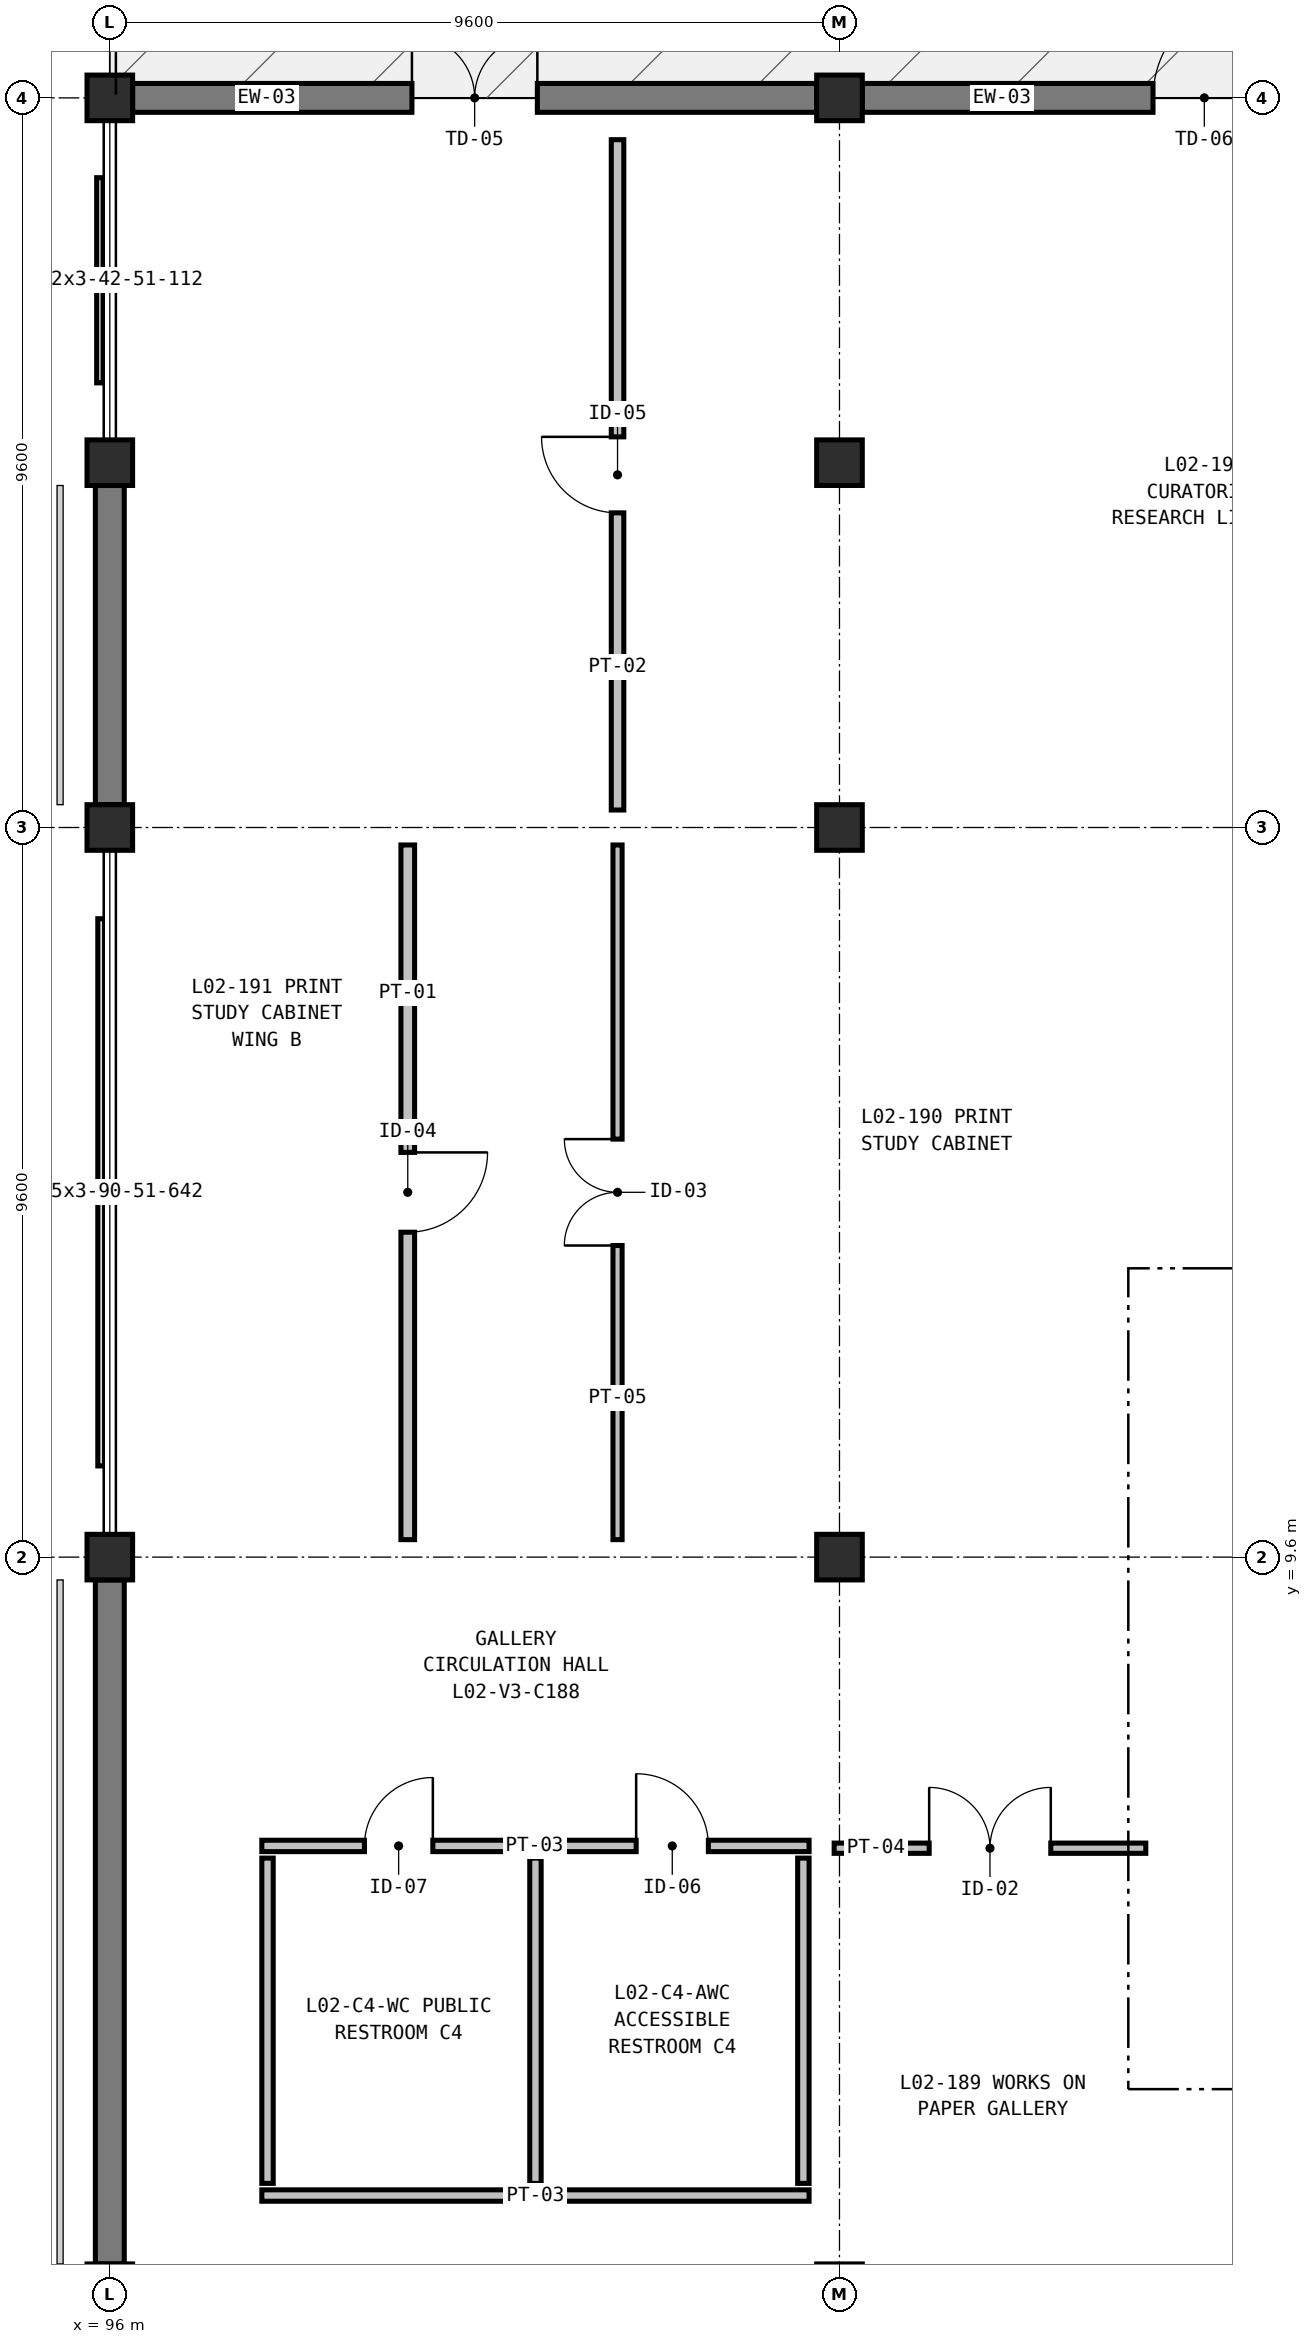
"""IFC4 building model, lengths in metres.
Left out: names, types, materials, properties, quantities, classifications, styles, units other than length and angle.
Written with IfcOpenShell. Run it as: python <this file> out.ifc"""

import sys

from ifc_helpers import new_model, si_unit, direction, frame, frame_2d, origin, origin_2d, place, context, subcontext, project, spatial, rectangle, extrude, element, fill, save


model = new_model("IFC4")
c1 = context("Model", 3, precision=1e-05, world=origin(), true_north=direction((0.0, 1.0)))
c2 = subcontext(c1, "Body", "Model", "MODEL_VIEW")
j1 = project(units=[si_unit("LENGTHUNIT", "METRE"), si_unit("PLANEANGLEUNIT", "RADIAN")], contexts=[c1])
p1 = place(None, origin())
s1 = spatial("IfcSite", under=j1, at=p1, CompositionType="ELEMENT")
p2 = place(p1, origin())
s2 = spatial("IfcBuilding", under=s1, at=p2, CompositionType="ELEMENT")
p3 = place(p2, frame((0.0, 0.0, 11.4)))
s3 = spatial("IfcBuildingStorey", under=s2, at=p3, CompositionType="ELEMENT", Elevation=11.4)
for number, where, z_axis, x_axis in (
    (1, (96.0, 9.6, 0.0), (0.0, 0.0, 1.0), (1.0, 0.0, 0.0)),
    (2, (96.0, 19.2, 0.0), (0.0, 0.0, 1.0), (1.0, 0.0, 0.0)),
    (3, (96.0, 24.0, 0.0), (0.0, 0.0, 1.0), (1.0, 0.0, 0.0)),
    (4, (96.0, 28.8, 0.0), (0.0, 0.0, 1.0), (1.0, 0.0, 0.0)),
    (5, (105.6, 9.6, 0.0), (0.0, 0.0, 1.0), (1.0, 0.0, 0.0)),
    (6, (105.6, 19.2, 0.0), (0.0, 0.0, 1.0), (1.0, 0.0, 0.0)),
    (7, (105.6, 24.0, 0.0), (0.0, 0.0, 1.0), (1.0, 0.0, 0.0)),
    (8, (105.6, 28.8, 0.0), (0.0, 0.0, 1.0), (1.0, 0.0, 0.0)),
):
    element("IfcColumn", number, at=place(p3, frame(where, z_axis=z_axis, x_axis=x_axis)), inside=s3, PredefinedType="COLUMN", context=c2, shape_type="SweptSolid", body=[
        extrude(rectangle(XDim=0.6, YDim=0.6, at=origin_2d()), origin(), (0.0, 0.0, 1.0), 5.4),
    ])
p4 = place(p3, frame((96.3, 28.8, 0.0), z_axis=(0.0, 0.0, 1.0), x_axis=(1.0, 0.0, 0.0)))
e9 = element("IfcWall", 9, at=p4, inside=s3, PredefinedType="SOLIDWALL", context=c2, shape_type="SweptSolid", body=[
    extrude(rectangle(XDim=9.0, YDim=0.38, at=frame_2d((4.5, 0.0))), origin(), (0.0, 0.0, 1.0), 5.1),
])
p5 = place(p4, frame((3.675, 0.0, 0.0)))
e10 = element("IfcOpeningElement", 10, at=p5, cuts=e9, PredefinedType="OPENING", context=c2, shape_type="SweptSolid", body=[
    extrude(rectangle(XDim=1.65, YDim=2.35, at=frame_2d((0.825, 1.175))), frame((0.0, 0.2, 0.0), z_axis=(0.0, -1.0, 0.0), x_axis=(1.0, 0.0, 0.0)), (0.0, 0.0, 1.0), 0.4),
])
p6 = place(p3, frame((105.9, 28.8, 0.0), z_axis=(0.0, 0.0, 1.0), x_axis=(1.0, 0.0, 0.0)))
e11 = element("IfcWall", 11, at=p6, inside=s3, PredefinedType="SOLIDWALL", context=c2, shape_type="SweptSolid", body=[
    extrude(rectangle(XDim=9.0, YDim=0.38, at=frame_2d((4.5, 0.0))), origin(), (0.0, 0.0, 1.0), 5.1),
])
p7 = place(p6, frame((3.825, 0.0, 0.0)))
e12 = element("IfcOpeningElement", 12, at=p7, cuts=e11, PredefinedType="OPENING", context=c2, shape_type="SweptSolid", body=[
    extrude(rectangle(XDim=1.35, YDim=2.2, at=frame_2d((0.675, 1.1))), frame((0.0, 0.2, 0.0), z_axis=(0.0, -1.0, 0.0), x_axis=(1.0, 0.0, 0.0)), (0.0, 0.0, 1.0), 0.4),
])
p8 = place(p3, frame((96.0, 0.3, 0.0), z_axis=(0.0, 0.0, 1.0), x_axis=(0.0, 1.0, 0.0)))
e13 = element("IfcWall", 13, at=p8, inside=s3, PredefinedType="SOLIDWALL", context=c2, shape_type="SweptSolid", body=[
    extrude(rectangle(XDim=9.0, YDim=0.38, at=frame_2d((4.5, 0.0))), origin(), (0.0, 0.0, 1.0), 5.1),
])
p9 = place(p3, frame((96.0, 19.5, 0.0), z_axis=(0.0, 0.0, 1.0), x_axis=(0.0, 1.0, 0.0)))
e14 = element("IfcWall", 14, at=p9, inside=s3, PredefinedType="SOLIDWALL", context=c2, shape_type="SweptSolid", body=[
    extrude(rectangle(XDim=4.2, YDim=0.38, at=frame_2d((2.1, 0.0))), origin(), (0.0, 0.0, 1.0), 5.1),
])
p10 = place(p3, frame((98.0, 5.8, 0.0), z_axis=(0.0, 0.0, 1.0), x_axis=(1.0, 0.0, 0.0)))
e15 = element("IfcWall", 15, at=p10, inside=s3, PredefinedType="PARTITIONING", context=c2, shape_type="SweptSolid", body=[
    extrude(rectangle(XDim=7.2, YDim=0.15, at=frame_2d((3.6, 0.0))), origin(), (0.0, 0.0, 1.0), 5.1),
])
p11 = place(p10, frame((1.35, 0.0, 0.0)))
e16 = element("IfcOpeningElement", 16, at=p11, cuts=e15, PredefinedType="OPENING", context=c2, shape_type="SweptSolid", body=[
    extrude(rectangle(XDim=0.9, YDim=2.1, at=frame_2d((0.45, 1.05))), frame((0.0, 0.085, 0.0), z_axis=(0.0, -1.0, 0.0), x_axis=(1.0, 0.0, 0.0)), (0.0, 0.0, 1.0), 0.17),
])
p12 = place(p10, frame((4.925, 0.0, 0.0)))
e17 = element("IfcOpeningElement", 17, at=p12, cuts=e15, PredefinedType="OPENING", context=c2, shape_type="SweptSolid", body=[
    extrude(rectangle(XDim=0.95, YDim=2.15, at=frame_2d((0.475, 1.075))), frame((0.0, 0.085, 0.0), z_axis=(0.0, -1.0, 0.0), x_axis=(1.0, 0.0, 0.0)), (0.0, 0.0, 1.0), 0.17),
])
p13 = place(p3, frame((98.0, 1.2, 0.0), z_axis=(0.0, 0.0, 1.0), x_axis=(1.0, 0.0, 0.0)))
e18 = element("IfcWall", 18, at=p13, inside=s3, PredefinedType="PARTITIONING", context=c2, shape_type="SweptSolid", body=[
    extrude(rectangle(XDim=7.2, YDim=0.15, at=frame_2d((3.6, 0.0))), origin(), (0.0, 0.0, 1.0), 5.1),
])
for number, where, z_axis, x_axis in (
    (19, (98.075, 1.36, 0.0), (0.0, 0.0, 1.0), (0.0, 1.0, 0.0)),
    (20, (101.6, 1.36, 0.0), (0.0, 0.0, 1.0), (0.0, 1.0, 0.0)),
    (21, (105.125, 1.36, 0.0), (0.0, 0.0, 1.0), (0.0, 1.0, 0.0)),
):
    element("IfcWall", number, at=place(p3, frame(where, z_axis=z_axis, x_axis=x_axis)), inside=s3, PredefinedType="PARTITIONING", context=c2, shape_type="SweptSolid", body=[
        extrude(rectangle(XDim=4.28, YDim=0.15, at=frame_2d((2.14, 0.0))), origin(), (0.0, 0.0, 1.0), 4.475),
    ])
p14 = place(p3, frame((105.53, 5.77, 0.0), z_axis=(0.0, 0.0, 1.0), x_axis=(1.0, 0.0, 0.0)))
e22 = element("IfcWall", 22, at=p14, inside=s3, PredefinedType="PARTITIONING", context=c2, shape_type="SweptSolid", body=[
    extrude(rectangle(XDim=4.1, YDim=0.135, at=frame_2d((2.05, 0.0))), origin(), (0.0, 0.0, 1.0), 4.275),
])
p15 = place(p14, frame((1.25, 0.0, 0.0)))
e23 = element("IfcOpeningElement", 23, at=p15, cuts=e22, PredefinedType="OPENING", context=c2, shape_type="SweptSolid", body=[
    extrude(rectangle(XDim=1.6, YDim=2.35, at=frame_2d((0.8, 1.175))), frame((0.0, 0.077, 0.0), z_axis=(0.0, -1.0, 0.0), x_axis=(1.0, 0.0, 0.0)), (0.0, 0.0, 1.0), 0.155),
])
p16 = place(p3, frame((102.68, 9.83, 0.0), z_axis=(0.0, 0.0, 1.0), x_axis=(0.0, 1.0, 0.0)))
e24 = element("IfcWall", 24, at=p16, inside=s3, PredefinedType="PARTITIONING", context=c2, shape_type="SweptSolid", body=[
    extrude(rectangle(XDim=9.14, YDim=0.12, at=frame_2d((4.57, 0.0))), origin(), (0.0, 0.0, 1.0), 4.325),
])
p17 = place(p16, frame((3.87, 0.0, 0.0)))
e25 = element("IfcOpeningElement", 25, at=p17, cuts=e24, PredefinedType="OPENING", context=c2, shape_type="SweptSolid", body=[
    extrude(rectangle(XDim=1.4, YDim=2.3, at=frame_2d((0.7, 1.15))), frame((0.0, 0.07, 0.0), z_axis=(0.0, -1.0, 0.0), x_axis=(1.0, 0.0, 0.0)), (0.0, 0.0, 1.0), 0.14),
])
p18 = place(p3, frame((99.92, 18.97, 0.0), z_axis=(0.0, 0.0, 1.0), x_axis=(0.0, -1.0, 0.0)))
e26 = element("IfcWall", 26, at=p18, inside=s3, PredefinedType="PARTITIONING", context=c2, shape_type="SweptSolid", body=[
    extrude(rectangle(XDim=9.14, YDim=0.18, at=frame_2d((4.57, 0.0))), origin(), (0.0, 0.0, 1.0), 4.325),
])
p19 = place(p18, frame((4.045, 0.0, 0.0)))
e27 = element("IfcOpeningElement", 27, at=p19, cuts=e26, PredefinedType="OPENING", context=c2, shape_type="SweptSolid", body=[
    extrude(rectangle(XDim=1.05, YDim=2.2, at=frame_2d((0.525, 1.1))), frame((0.0, 0.1, 0.0), z_axis=(0.0, -1.0, 0.0), x_axis=(1.0, 0.0, 0.0)), (0.0, 0.0, 1.0), 0.2),
])
p20 = place(p3, frame((102.68, 19.43, 0.0), z_axis=(0.0, 0.0, 1.0), x_axis=(0.0, 1.0, 0.0)))
e28 = element("IfcWall", 28, at=p20, inside=s3, PredefinedType="PARTITIONING", context=c2, shape_type="SweptSolid", body=[
    extrude(rectangle(XDim=8.82, YDim=0.165, at=frame_2d((4.41, 0.0))), origin(), (0.0, 0.0, 1.0), 4.325),
])
p21 = place(p20, frame((3.91, 0.0, 0.0)))
e29 = element("IfcOpeningElement", 29, at=p21, cuts=e28, PredefinedType="OPENING", context=c2, shape_type="SweptSolid", body=[
    extrude(rectangle(XDim=1.0, YDim=2.15, at=frame_2d((0.5, 1.075))), frame((0.0, 0.093, 0.0), z_axis=(0.0, -1.0, 0.0), x_axis=(1.0, 0.0, 0.0)), (0.0, 0.0, 1.0), 0.185),
])
p22 = place(p5, origin())
e30 = element("IfcDoor", 30, at=p22, inside=s3, OperationType="DOUBLE_DOOR_SINGLE_SWING", PredefinedType="DOOR", context=c2, shape_type="SweptSolid", body=[
    extrude(rectangle(XDim=1.65, YDim=2.35, at=frame_2d((0.825, 1.175))), frame((0.0, 0.025, 0.0), z_axis=(0.0, -1.0, 0.0), x_axis=(1.0, 0.0, 0.0)), (0.0, 0.0, 1.0), 0.05),
])
fill(e10, e30)
p23 = place(p7, origin())
e31 = element("IfcDoor", 31, at=p23, inside=s3, OperationType="SINGLE_SWING_RIGHT", PredefinedType="DOOR", context=c2, shape_type="SweptSolid", body=[
    extrude(rectangle(XDim=1.35, YDim=2.2, at=frame_2d((0.675, 1.1))), frame((0.0, 0.025, 0.0), z_axis=(0.0, -1.0, 0.0), x_axis=(1.0, 0.0, 0.0)), (0.0, 0.0, 1.0), 0.05),
])
fill(e12, e31)
p24 = place(p11, origin())
e32 = element("IfcDoor", 32, at=p24, inside=s3, OperationType="SINGLE_SWING_RIGHT", PredefinedType="DOOR", context=c2, shape_type="SweptSolid", body=[
    extrude(rectangle(XDim=0.9, YDim=2.1, at=frame_2d((0.45, 1.05))), frame((0.0, 0.025, 0.0), z_axis=(0.0, -1.0, 0.0), x_axis=(1.0, 0.0, 0.0)), (0.0, 0.0, 1.0), 0.05),
])
fill(e16, e32)
p25 = place(p12, origin())
e33 = element("IfcDoor", 33, at=p25, inside=s3, OperationType="SINGLE_SWING_LEFT", PredefinedType="DOOR", context=c2, shape_type="SweptSolid", body=[
    extrude(rectangle(XDim=0.95, YDim=2.15, at=frame_2d((0.475, 1.075))), frame((0.0, 0.025, 0.0), z_axis=(0.0, -1.0, 0.0), x_axis=(1.0, 0.0, 0.0)), (0.0, 0.0, 1.0), 0.05),
])
fill(e17, e33)
p26 = place(p15, origin())
e34 = element("IfcDoor", 34, at=p26, inside=s3, OperationType="DOUBLE_DOOR_SINGLE_SWING", PredefinedType="DOOR", context=c2, shape_type="SweptSolid", body=[
    extrude(rectangle(XDim=1.6, YDim=2.35, at=frame_2d((0.8, 1.175))), frame((0.0, 0.025, 0.0), z_axis=(0.0, -1.0, 0.0), x_axis=(1.0, 0.0, 0.0)), (0.0, 0.0, 1.0), 0.05),
])
fill(e23, e34)
p27 = place(p17, origin())
e35 = element("IfcDoor", 35, at=p27, inside=s3, OperationType="DOUBLE_DOOR_SINGLE_SWING", PredefinedType="DOOR", context=c2, shape_type="SweptSolid", body=[
    extrude(rectangle(XDim=1.4, YDim=2.3, at=frame_2d((0.7, 1.15))), frame((0.0, 0.025, 0.0), z_axis=(0.0, -1.0, 0.0), x_axis=(1.0, 0.0, 0.0)), (0.0, 0.0, 1.0), 0.05),
])
fill(e25, e35)
p28 = place(p19, origin())
e36 = element("IfcDoor", 36, at=p28, inside=s3, OperationType="SINGLE_SWING_LEFT", PredefinedType="DOOR", context=c2, shape_type="SweptSolid", body=[
    extrude(rectangle(XDim=1.05, YDim=2.2, at=frame_2d((0.525, 1.1))), frame((0.0, 0.025, 0.0), z_axis=(0.0, -1.0, 0.0), x_axis=(1.0, 0.0, 0.0)), (0.0, 0.0, 1.0), 0.05),
])
fill(e27, e36)
p29 = place(p21, origin())
e37 = element("IfcDoor", 37, at=p29, inside=s3, OperationType="SINGLE_SWING_RIGHT", PredefinedType="DOOR", context=c2, shape_type="SweptSolid", body=[
    extrude(rectangle(XDim=1.0, YDim=2.15, at=frame_2d((0.5, 1.075))), frame((0.0, 0.025, 0.0), z_axis=(0.0, -1.0, 0.0), x_axis=(1.0, 0.0, 0.0)), (0.0, 0.0, 1.0), 0.05),
])
fill(e29, e37)
save(model, sys.argv[1])
